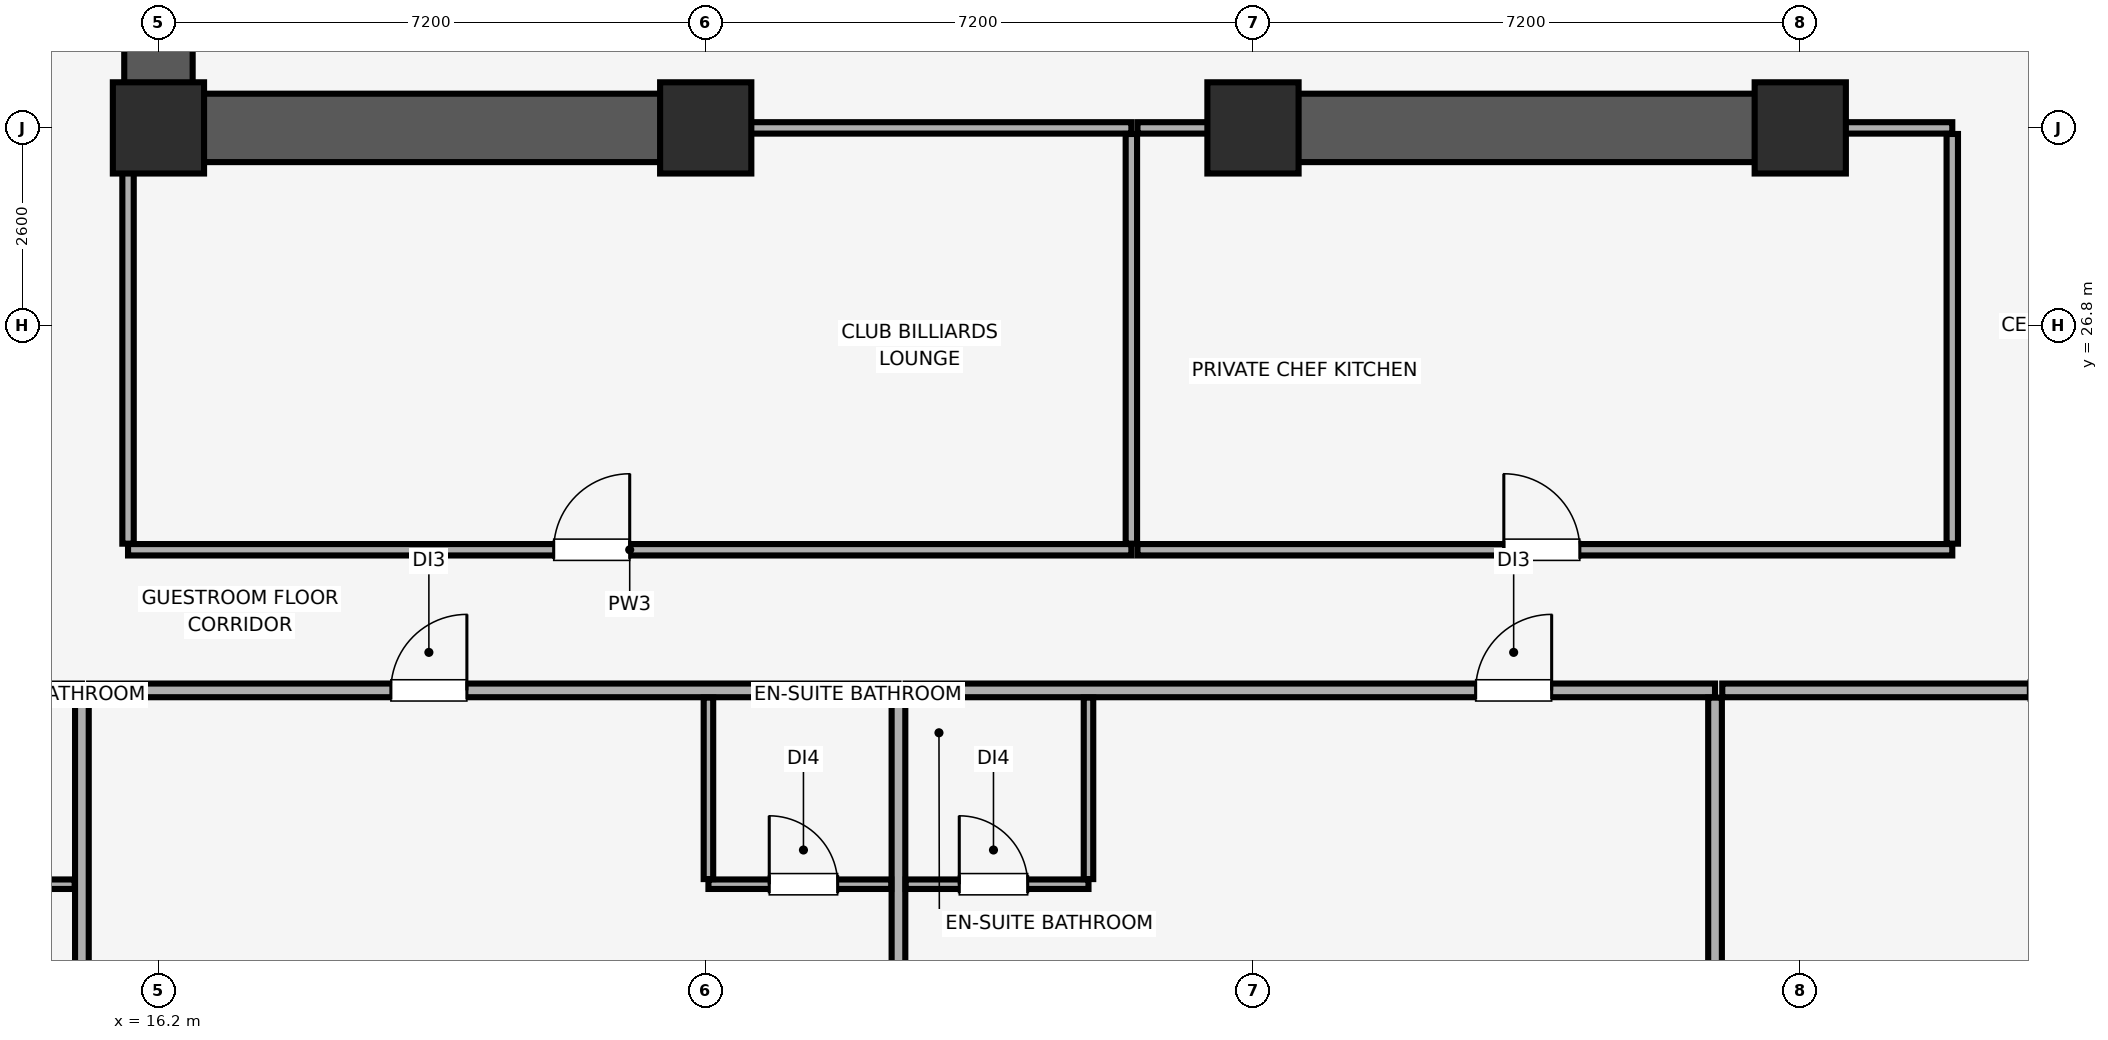
"""IFC4 building model, lengths in metres.
Left out: names, types, materials, properties, quantities, classifications, styles, units other than length and angle.
Written with IfcOpenShell. Run it as: python <this file> out.ifc"""

import sys

from ifc_helpers import new_model, si_unit, direction, frame, frame_2d, origin, origin_2d, place, context, subcontext, project, spatial, rectangle, extrude, element, fill, save


model = new_model("IFC4")
c1 = context("Model", 3, precision=1e-05, world=origin(), true_north=direction((0.0, 1.0)))
c2 = subcontext(c1, "Body", "Model", "MODEL_VIEW")
j1 = project(units=[si_unit("LENGTHUNIT", "METRE"), si_unit("PLANEANGLEUNIT", "RADIAN")], contexts=[c1])
p1 = place(None, origin())
s1 = spatial("IfcSite", under=j1, at=p1, CompositionType="ELEMENT")
p2 = place(p1, origin())
s2 = spatial("IfcBuilding", under=s1, at=p2, CompositionType="ELEMENT")
p3 = place(p2, frame((0.0, 0.0, 104.3)))
s3 = spatial("IfcBuildingStorey", under=s2, at=p3, CompositionType="ELEMENT", Elevation=104.3)
for number, where, z_axis, x_axis in (
    (1, (16.2, 29.4, 0.0), (0.0, 0.0, 1.0), (1.0, 0.0, 0.0)),
    (2, (23.4, 29.4, 0.0), (0.0, 0.0, 1.0), (1.0, 0.0, 0.0)),
    (3, (30.6, 29.4, 0.0), (0.0, 0.0, 1.0), (1.0, 0.0, 0.0)),
    (4, (37.8, 29.4, 0.0), (0.0, 0.0, 1.0), (1.0, 0.0, 0.0)),
):
    element("IfcColumn", number, at=place(p3, frame(where, z_axis=z_axis, x_axis=x_axis)), inside=s3, PredefinedType="COLUMN", context=c2, shape_type="SweptSolid", body=[
        extrude(rectangle(XDim=1.2, YDim=1.2, at=origin_2d()), origin(), (0.0, 0.0, 1.0), 3.51),
    ])
p4 = place(p3, frame((16.2, 29.4, 0.0), z_axis=(0.0, 0.0, 1.0), x_axis=(0.0, 1.0, 0.0)))
e5 = element("IfcWall", 5, at=p4, inside=s3, PredefinedType="SHEAR", context=c2, shape_type="SweptSolid", body=[
    extrude(rectangle(XDim=19.2, YDim=0.9, at=frame_2d((9.6, 0.0))), origin(), (0.0, 0.0, 1.0), 3.51),
])
p5 = place(p3, frame((16.655, 29.4, 0.0), z_axis=(0.0, 0.0, 1.0), x_axis=(1.0, 0.0, 0.0)))
e6 = element("IfcWall", 6, at=p5, inside=s3, PredefinedType="SHEAR", context=c2, shape_type="SweptSolid", body=[
    extrude(rectangle(XDim=6.945, YDim=0.9, at=frame_2d((3.473, 0.0))), origin(), (0.0, 0.0, 1.0), 3.51),
])
p6 = place(p3, frame((30.4, 29.4, 0.0), z_axis=(0.0, 0.0, 1.0), x_axis=(1.0, 0.0, 0.0)))
e7 = element("IfcWall", 7, at=p6, inside=s3, PredefinedType="SHEAR", context=c2, shape_type="SweptSolid", body=[
    extrude(rectangle(XDim=7.6, YDim=0.9, at=frame_2d((3.8, 0.0))), origin(), (0.0, 0.0, 1.0), 3.51),
])
p7 = place(p3, frame((0.15, 22.0, 0.0), z_axis=(0.0, 0.0, 1.0), x_axis=(1.0, 0.0, 0.0)))
e8 = element("IfcWall", 8, at=p7, inside=s3, PredefinedType="PARTITIONING", context=c2, shape_type="SweptSolid", body=[
    extrude(rectangle(XDim=15.043, YDim=0.18, at=frame_2d((7.521, 0.0))), origin(), (0.0, 0.0, 1.0), 3.51),
])
p8 = place(p7, frame((5.685, 0.0, 0.0)))
e9 = element("IfcOpeningElement", 9, at=p8, cuts=e8, PredefinedType="OPENING", context=c2, shape_type="SweptSolid", body=[
    extrude(rectangle(XDim=1.0, YDim=2.15, at=frame_2d((0.5, 1.075))), frame((0.0, 0.1, 0.0), z_axis=(0.0, -1.0, 0.0), x_axis=(1.0, 0.0, 0.0)), (0.0, 0.0, 1.0), 0.2),
])
p9 = place(p3, frame((15.193, 0.15, 0.0), z_axis=(0.0, 0.0, 1.0), x_axis=(0.0, 1.0, 0.0)))
e10 = element("IfcWall", 10, at=p9, inside=s3, PredefinedType="PARTITIONING", context=c2, shape_type="SweptSolid", body=[
    extrude(rectangle(XDim=21.755, YDim=0.18, at=frame_2d((10.877, 0.0))), origin(), (0.0, 0.0, 1.0), 3.51),
])
p10 = place(p3, frame((12.693, 19.45, 0.0), z_axis=(0.0, 0.0, 1.0), x_axis=(1.0, 0.0, 0.0)))
e11 = element("IfcWall", 11, at=p10, inside=s3, PredefinedType="PARTITIONING", context=c2, shape_type="SweptSolid", body=[
    extrude(rectangle(XDim=2.405, YDim=0.125, at=frame_2d((1.203, 0.0))), origin(), (0.0, 0.0, 1.0), 3.51),
])
p11 = place(p10, frame((0.8, 0.0, 0.0)))
e12 = element("IfcOpeningElement", 12, at=p11, cuts=e11, PredefinedType="OPENING", context=c2, shape_type="SweptSolid", body=[
    extrude(rectangle(XDim=0.9, YDim=2.1, at=frame_2d((0.45, 1.05))), frame((0.0, 0.073, 0.0), z_axis=(0.0, -1.0, 0.0), x_axis=(1.0, 0.0, 0.0)), (0.0, 0.0, 1.0), 0.145),
])
p12 = place(p3, frame((15.288, 22.0, 0.0), z_axis=(0.0, 0.0, 1.0), x_axis=(1.0, 0.0, 0.0)))
e13 = element("IfcWall", 13, at=p12, inside=s3, PredefinedType="PARTITIONING", context=c2, shape_type="SweptSolid", body=[
    extrude(rectangle(XDim=10.648, YDim=0.18, at=frame_2d((5.324, 0.0))), origin(), (0.0, 0.0, 1.0), 3.51),
])
p13 = place(p12, frame((3.97, 0.0, 0.0)))
e14 = element("IfcOpeningElement", 14, at=p13, cuts=e13, PredefinedType="OPENING", context=c2, shape_type="SweptSolid", body=[
    extrude(rectangle(XDim=1.0, YDim=2.15, at=frame_2d((0.5, 1.075))), frame((0.0, 0.1, 0.0), z_axis=(0.0, -1.0, 0.0), x_axis=(1.0, 0.0, 0.0)), (0.0, 0.0, 1.0), 0.2),
])
p14 = place(p3, frame((25.936, 0.15, 0.0), z_axis=(0.0, 0.0, 1.0), x_axis=(0.0, 1.0, 0.0)))
e15 = element("IfcWall", 15, at=p14, inside=s3, PredefinedType="PARTITIONING", context=c2, shape_type="SweptSolid", body=[
    extrude(rectangle(XDim=21.755, YDim=0.18, at=frame_2d((10.877, 0.0))), origin(), (0.0, 0.0, 1.0), 3.51),
])
p15 = place(p3, frame((23.436, 19.45, 0.0), z_axis=(0.0, 0.0, 1.0), x_axis=(1.0, 0.0, 0.0)))
e16 = element("IfcWall", 16, at=p15, inside=s3, PredefinedType="PARTITIONING", context=c2, shape_type="SweptSolid", body=[
    extrude(rectangle(XDim=2.405, YDim=0.125, at=frame_2d((1.203, 0.0))), origin(), (0.0, 0.0, 1.0), 3.51),
])
p16 = place(p15, frame((0.8, 0.0, 0.0)))
e17 = element("IfcOpeningElement", 17, at=p16, cuts=e16, PredefinedType="OPENING", context=c2, shape_type="SweptSolid", body=[
    extrude(rectangle(XDim=0.9, YDim=2.1, at=frame_2d((0.45, 1.05))), frame((0.0, 0.073, 0.0), z_axis=(0.0, -1.0, 0.0), x_axis=(1.0, 0.0, 0.0)), (0.0, 0.0, 1.0), 0.145),
])
p17 = place(p3, frame((23.436, 19.518, 0.0), z_axis=(0.0, 0.0, 1.0), x_axis=(0.0, 1.0, 0.0)))
e18 = element("IfcWall", 18, at=p17, inside=s3, PredefinedType="PARTITIONING", context=c2, shape_type="SweptSolid", body=[
    extrude(rectangle(XDim=2.387, YDim=0.125, at=frame_2d((1.194, 0.0))), origin(), (0.0, 0.0, 1.0), 2.977),
])
p18 = place(p3, frame((26.031, 22.0, 0.0), z_axis=(0.0, 0.0, 1.0), x_axis=(1.0, 0.0, 0.0)))
e19 = element("IfcWall", 19, at=p18, inside=s3, PredefinedType="PARTITIONING", context=c2, shape_type="SweptSolid", body=[
    extrude(rectangle(XDim=10.648, YDim=0.18, at=frame_2d((5.324, 0.0))), origin(), (0.0, 0.0, 1.0), 3.51),
])
p19 = place(p18, frame((7.499, 0.0, 0.0)))
e20 = element("IfcOpeningElement", 20, at=p19, cuts=e19, PredefinedType="OPENING", context=c2, shape_type="SweptSolid", body=[
    extrude(rectangle(XDim=1.0, YDim=2.15, at=frame_2d((0.5, 1.075))), frame((0.0, 0.1, 0.0), z_axis=(0.0, -1.0, 0.0), x_axis=(1.0, 0.0, 0.0)), (0.0, 0.0, 1.0), 0.2),
])
p20 = place(p3, frame((36.679, 0.15, 0.0), z_axis=(0.0, 0.0, 1.0), x_axis=(0.0, 1.0, 0.0)))
e21 = element("IfcWall", 21, at=p20, inside=s3, PredefinedType="PARTITIONING", context=c2, shape_type="SweptSolid", body=[
    extrude(rectangle(XDim=21.755, YDim=0.18, at=frame_2d((10.877, 0.0))), origin(), (0.0, 0.0, 1.0), 3.51),
])
p21 = place(p3, frame((26.031, 19.45, 0.0), z_axis=(0.0, 0.0, 1.0), x_axis=(1.0, 0.0, 0.0)))
e22 = element("IfcWall", 22, at=p21, inside=s3, PredefinedType="PARTITIONING", context=c2, shape_type="SweptSolid", body=[
    extrude(rectangle(XDim=2.405, YDim=0.125, at=frame_2d((1.203, 0.0))), origin(), (0.0, 0.0, 1.0), 3.51),
])
p22 = place(p21, frame((0.705, 0.0, 0.0)))
e23 = element("IfcOpeningElement", 23, at=p22, cuts=e22, PredefinedType="OPENING", context=c2, shape_type="SweptSolid", body=[
    extrude(rectangle(XDim=0.9, YDim=2.1, at=frame_2d((0.45, 1.05))), frame((0.0, 0.073, 0.0), z_axis=(0.0, -1.0, 0.0), x_axis=(1.0, 0.0, 0.0)), (0.0, 0.0, 1.0), 0.145),
])
p23 = place(p3, frame((28.436, 19.518, 0.0), z_axis=(0.0, 0.0, 1.0), x_axis=(0.0, 1.0, 0.0)))
e24 = element("IfcWall", 24, at=p23, inside=s3, PredefinedType="PARTITIONING", context=c2, shape_type="SweptSolid", body=[
    extrude(rectangle(XDim=2.387, YDim=0.125, at=frame_2d((1.194, 0.0))), origin(), (0.0, 0.0, 1.0), 3.51),
])
p24 = place(p3, frame((36.774, 22.0, 0.0), z_axis=(0.0, 0.0, 1.0), x_axis=(1.0, 0.0, 0.0)))
e25 = element("IfcWall", 25, at=p24, inside=s3, PredefinedType="PARTITIONING", context=c2, shape_type="SweptSolid", body=[
    extrude(rectangle(XDim=10.648, YDim=0.18, at=frame_2d((5.324, 0.0))), origin(), (0.0, 0.0, 1.0), 3.51),
])
p25 = place(p24, frame((4.027, 0.0, 0.0)))
e26 = element("IfcOpeningElement", 26, at=p25, cuts=e25, PredefinedType="OPENING", context=c2, shape_type="SweptSolid", body=[
    extrude(rectangle(XDim=1.0, YDim=2.15, at=frame_2d((0.5, 1.075))), frame((0.0, 0.1, 0.0), z_axis=(0.0, -1.0, 0.0), x_axis=(1.0, 0.0, 0.0)), (0.0, 0.0, 1.0), 0.2),
])
p26 = place(p3, frame((15.8, 23.85, 0.0), z_axis=(0.0, 0.0, 1.0), x_axis=(1.0, 0.0, 0.0)))
e27 = element("IfcWall", 27, at=p26, inside=s3, PredefinedType="PARTITIONING", context=c2, shape_type="SweptSolid", body=[
    extrude(rectangle(XDim=13.2, YDim=0.15, at=frame_2d((6.6, 0.0))), origin(), (0.0, 0.0, 1.0), 3.51),
])
p27 = place(p26, frame((5.6, 0.0, 0.0)))
e28 = element("IfcOpeningElement", 28, at=p27, cuts=e27, PredefinedType="OPENING", context=c2, shape_type="SweptSolid", body=[
    extrude(rectangle(XDim=1.0, YDim=2.15, at=frame_2d((0.5, 1.075))), frame((0.0, 0.085, 0.0), z_axis=(0.0, -1.0, 0.0), x_axis=(1.0, 0.0, 0.0)), (0.0, 0.0, 1.0), 0.17),
])
p28 = place(p3, frame((23.61, 29.4, 0.0), z_axis=(0.0, 0.0, 1.0), x_axis=(1.0, 0.0, 0.0)))
e29 = element("IfcWall", 29, at=p28, inside=s3, PredefinedType="PARTITIONING", context=c2, shape_type="SweptSolid", body=[
    extrude(rectangle(XDim=5.39, YDim=0.15, at=frame_2d((2.695, 0.0))), origin(), (0.0, 0.0, 1.0), 2.41),
])
p29 = place(p3, frame((15.8, 23.93, 0.0), z_axis=(0.0, 0.0, 1.0), x_axis=(0.0, 1.0, 0.0)))
e30 = element("IfcWall", 30, at=p29, inside=s3, PredefinedType="PARTITIONING", context=c2, shape_type="SweptSolid", body=[
    extrude(rectangle(XDim=5.46, YDim=0.15, at=frame_2d((2.73, 0.0))), origin(), (0.0, 0.0, 1.0), 3.51),
])
p30 = place(p3, frame((29.0, 23.93, 0.0), z_axis=(0.0, 0.0, 1.0), x_axis=(0.0, 1.0, 0.0)))
e31 = element("IfcWall", 31, at=p30, inside=s3, PredefinedType="PARTITIONING", context=c2, shape_type="SweptSolid", body=[
    extrude(rectangle(XDim=5.39, YDim=0.15, at=frame_2d((2.695, 0.0))), origin(), (0.0, 0.0, 1.0), 3.51),
])
p31 = place(p3, frame((29.08, 23.85, 0.0), z_axis=(0.0, 0.0, 1.0), x_axis=(1.0, 0.0, 0.0)))
e32 = element("IfcWall", 32, at=p31, inside=s3, PredefinedType="PARTITIONING", context=c2, shape_type="SweptSolid", body=[
    extrude(rectangle(XDim=10.72, YDim=0.15, at=frame_2d((5.36, 0.0))), origin(), (0.0, 0.0, 1.0), 3.51),
])
p32 = place(p31, frame((4.82, 0.0, 0.0)))
e33 = element("IfcOpeningElement", 33, at=p32, cuts=e32, PredefinedType="OPENING", context=c2, shape_type="SweptSolid", body=[
    extrude(rectangle(XDim=1.0, YDim=2.15, at=frame_2d((0.5, 1.075))), frame((0.0, 0.085, 0.0), z_axis=(0.0, -1.0, 0.0), x_axis=(1.0, 0.0, 0.0)), (0.0, 0.0, 1.0), 0.17),
])
p33 = place(p3, frame((29.08, 29.4, 0.0), z_axis=(0.0, 0.0, 1.0), x_axis=(1.0, 0.0, 0.0)))
e34 = element("IfcWall", 34, at=p33, inside=s3, PredefinedType="PARTITIONING", context=c2, shape_type="SweptSolid", body=[
    extrude(rectangle(XDim=1.31, YDim=0.15, at=frame_2d((0.655, 0.0))), origin(), (0.0, 0.0, 1.0), 2.41),
])
p34 = place(p3, frame((38.01, 29.4, 0.0), z_axis=(0.0, 0.0, 1.0), x_axis=(1.0, 0.0, 0.0)))
e35 = element("IfcWall", 35, at=p34, inside=s3, PredefinedType="PARTITIONING", context=c2, shape_type="SweptSolid", body=[
    extrude(rectangle(XDim=1.79, YDim=0.15, at=frame_2d((0.895, 0.0))), origin(), (0.0, 0.0, 1.0), 2.41),
])
p35 = place(p3, frame((39.8, 23.93, 0.0), z_axis=(0.0, 0.0, 1.0), x_axis=(0.0, 1.0, 0.0)))
e36 = element("IfcWall", 36, at=p35, inside=s3, PredefinedType="PARTITIONING", context=c2, shape_type="SweptSolid", body=[
    extrude(rectangle(XDim=5.39, YDim=0.15, at=frame_2d((2.695, 0.0))), origin(), (0.0, 0.0, 1.0), 3.51),
])
p36 = place(p13, origin())
e37 = element("IfcDoor", 37, at=p36, inside=s3, OperationType="SINGLE_SWING_RIGHT", PredefinedType="DOOR", context=c2, shape_type="SweptSolid", body=[
    extrude(rectangle(XDim=1.0, YDim=2.15, at=frame_2d((0.5, 1.075))), frame((0.0, 0.025, 0.0), z_axis=(0.0, -1.0, 0.0), x_axis=(1.0, 0.0, 0.0)), (0.0, 0.0, 1.0), 0.05),
])
fill(e14, e37)
p37 = place(p16, origin())
e38 = element("IfcDoor", 38, at=p37, inside=s3, OperationType="SINGLE_SWING_LEFT", PredefinedType="DOOR", context=c2, shape_type="SweptSolid", body=[
    extrude(rectangle(XDim=0.9, YDim=2.1, at=frame_2d((0.45, 1.05))), frame((0.0, 0.025, 0.0), z_axis=(0.0, -1.0, 0.0), x_axis=(1.0, 0.0, 0.0)), (0.0, 0.0, 1.0), 0.05),
])
fill(e17, e38)
p38 = place(p19, origin())
e39 = element("IfcDoor", 39, at=p38, inside=s3, OperationType="SINGLE_SWING_RIGHT", PredefinedType="DOOR", context=c2, shape_type="SweptSolid", body=[
    extrude(rectangle(XDim=1.0, YDim=2.15, at=frame_2d((0.5, 1.075))), frame((0.0, 0.025, 0.0), z_axis=(0.0, -1.0, 0.0), x_axis=(1.0, 0.0, 0.0)), (0.0, 0.0, 1.0), 0.05),
])
fill(e20, e39)
p39 = place(p22, origin())
e40 = element("IfcDoor", 40, at=p39, inside=s3, OperationType="SINGLE_SWING_LEFT", PredefinedType="DOOR", context=c2, shape_type="SweptSolid", body=[
    extrude(rectangle(XDim=0.9, YDim=2.1, at=frame_2d((0.45, 1.05))), frame((0.0, 0.025, 0.0), z_axis=(0.0, -1.0, 0.0), x_axis=(1.0, 0.0, 0.0)), (0.0, 0.0, 1.0), 0.05),
])
fill(e23, e40)
p40 = place(p27, origin())
e41 = element("IfcDoor", 41, at=p40, inside=s3, OperationType="SINGLE_SWING_RIGHT", PredefinedType="DOOR", context=c2, shape_type="SweptSolid", body=[
    extrude(rectangle(XDim=1.0, YDim=2.15, at=frame_2d((0.5, 1.075))), frame((0.0, 0.025, 0.0), z_axis=(0.0, -1.0, 0.0), x_axis=(1.0, 0.0, 0.0)), (0.0, 0.0, 1.0), 0.05),
])
fill(e28, e41)
p41 = place(p32, origin())
e42 = element("IfcDoor", 42, at=p41, inside=s3, OperationType="SINGLE_SWING_LEFT", PredefinedType="DOOR", context=c2, shape_type="SweptSolid", body=[
    extrude(rectangle(XDim=1.0, YDim=2.15, at=frame_2d((0.5, 1.075))), frame((0.0, 0.025, 0.0), z_axis=(0.0, -1.0, 0.0), x_axis=(1.0, 0.0, 0.0)), (0.0, 0.0, 1.0), 0.05),
])
fill(e33, e42)
save(model, sys.argv[1])
